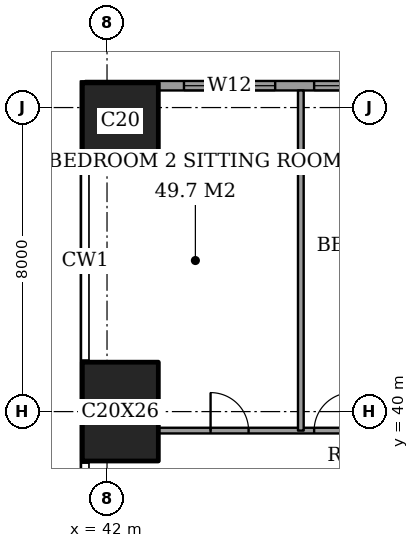
"""IFC4 building model, lengths in metres.
Left out: names, types, materials, properties, quantities, classifications, styles, units other than length and angle.
Written with IfcOpenShell. Run it as: python <this file> out.ifc"""

import sys

from ifc_helpers import new_model, si_unit, direction, frame, frame_2d, origin, origin_2d, place, context, subcontext, project, spatial, rectangle, extrude, element, fill, save


model = new_model("IFC4")
c1 = context("Model", 3, precision=1e-05, world=origin(), true_north=direction((0.0, 1.0)))
c2 = subcontext(c1, "Body", "Model", "MODEL_VIEW")
j1 = project(units=[si_unit("LENGTHUNIT", "METRE"), si_unit("PLANEANGLEUNIT", "RADIAN")], contexts=[c1])
p1 = place(None, origin())
s1 = spatial("IfcSite", under=j1, at=p1, CompositionType="ELEMENT")
p2 = place(p1, origin())
s2 = spatial("IfcBuilding", under=s1, at=p2, CompositionType="ELEMENT")
p3 = place(p2, frame((0.0, 0.0, 121.4)))
s3 = spatial("IfcBuildingStorey", under=s2, at=p3, CompositionType="ELEMENT", Elevation=121.4)
p4 = place(p3, frame((42.35, 40.0, 0.0), z_axis=(0.0, 0.0, 1.0), x_axis=(1.0, 0.0, 0.0)))
e1 = element("IfcColumn", 1, at=p4, inside=s3, PredefinedType="COLUMN", context=c2, shape_type="SweptSolid", body=[
    extrude(rectangle(XDim=2.0, YDim=2.6, at=origin_2d()), origin(), (0.0, 0.0, 1.0), 3.6),
])
p5 = place(p3, frame((42.35, 47.65, 0.0), z_axis=(0.0, 0.0, 1.0), x_axis=(1.0, 0.0, 0.0)))
e2 = element("IfcColumn", 2, at=p5, inside=s3, PredefinedType="COLUMN", context=c2, shape_type="SweptSolid", body=[
    extrude(rectangle(XDim=2.0, YDim=2.0, at=origin_2d()), origin(), (0.0, 0.0, 1.0), 3.6),
])
p6 = place(p3, frame((62.825, 48.575, 0.0), z_axis=(0.0, 0.0, 1.0), x_axis=(-1.0, 0.0, 0.0)))
e3 = element("IfcWall", 3, at=p6, inside=s3, PredefinedType="SOLIDWALL", context=c2, shape_type="SweptSolid", body=[
    extrude(rectangle(XDim=21.4, YDim=0.25, at=frame_2d((10.7, 0.0))), origin(), (0.0, 0.0, 1.0), 3.6),
])
p7 = place(p6, frame((0.875, 0.0, 0.4)))
e4 = element("IfcOpeningElement", 4, at=p7, cuts=e3, PredefinedType="OPENING", context=c2, shape_type="SweptSolid", body=[
    extrude(rectangle(XDim=1.2, YDim=2.2, at=frame_2d((0.6, 1.1))), frame((0.0, 0.135, 0.0), z_axis=(0.0, -1.0, 0.0), x_axis=(1.0, 0.0, 0.0)), (0.0, 0.0, 1.0), 0.27),
])
p8 = place(p6, frame((6.525, 0.0, 0.4)))
e5 = element("IfcOpeningElement", 5, at=p8, cuts=e3, PredefinedType="OPENING", context=c2, shape_type="SweptSolid", body=[
    extrude(rectangle(XDim=2.4, YDim=2.2, at=frame_2d((1.2, 1.1))), frame((0.0, 0.135, 0.0), z_axis=(0.0, -1.0, 0.0), x_axis=(1.0, 0.0, 0.0)), (0.0, 0.0, 1.0), 0.27),
])
p9 = place(p6, frame((9.975, 0.0, 0.4)))
e6 = element("IfcOpeningElement", 6, at=p9, cuts=e3, PredefinedType="OPENING", context=c2, shape_type="SweptSolid", body=[
    extrude(rectangle(XDim=1.2, YDim=2.2, at=frame_2d((0.6, 1.1))), frame((0.0, 0.135, 0.0), z_axis=(0.0, -1.0, 0.0), x_axis=(1.0, 0.0, 0.0)), (0.0, 0.0, 1.0), 0.27),
])
p10 = place(p6, frame((14.175, 0.0, 0.4)))
e7 = element("IfcOpeningElement", 7, at=p10, cuts=e3, PredefinedType="OPENING", context=c2, shape_type="SweptSolid", body=[
    extrude(rectangle(XDim=1.2, YDim=2.2, at=frame_2d((0.6, 1.1))), frame((0.0, 0.135, 0.0), z_axis=(0.0, -1.0, 0.0), x_axis=(1.0, 0.0, 0.0)), (0.0, 0.0, 1.0), 0.27),
])
p11 = place(p6, frame((16.4, 0.0, 0.4)))
e8 = element("IfcOpeningElement", 8, at=p11, cuts=e3, PredefinedType="OPENING", context=c2, shape_type="SweptSolid", body=[
    extrude(rectangle(XDim=2.4, YDim=2.2, at=frame_2d((1.2, 1.1))), frame((0.0, 0.135, 0.0), z_axis=(0.0, -1.0, 0.0), x_axis=(1.0, 0.0, 0.0)), (0.0, 0.0, 1.0), 0.27),
])
p12 = place(p3, frame((43.35, 39.5, 0.0), z_axis=(0.0, 0.0, 1.0), x_axis=(1.0, 0.0, 0.0)))
e9 = element("IfcWall", 9, at=p12, inside=s3, PredefinedType="PARTITIONING", context=c2, shape_type="SweptSolid", body=[
    extrude(rectangle(XDim=5.45, YDim=0.15, at=frame_2d((2.725, 0.0))), origin(), (0.0, 0.0, 1.0), 3.35),
])
p13 = place(p12, frame((4.1, 0.0, 0.0)))
e10 = element("IfcOpeningElement", 10, at=p13, cuts=e9, PredefinedType="OPENING", context=c2, shape_type="SweptSolid", body=[
    extrude(rectangle(XDim=1.0, YDim=2.1, at=frame_2d((0.5, 1.05))), frame((0.0, 0.085, 0.0), z_axis=(0.0, -1.0, 0.0), x_axis=(1.0, 0.0, 0.0)), (0.0, 0.0, 1.0), 0.17),
])
p14 = place(p12, frame((1.375, 0.0, 0.0)))
e11 = element("IfcOpeningElement", 11, at=p14, cuts=e9, PredefinedType="OPENING", context=c2, shape_type="SweptSolid", body=[
    extrude(rectangle(XDim=1.0, YDim=2.1, at=frame_2d((0.5, 1.05))), frame((0.0, 0.085, 0.0), z_axis=(0.0, -1.0, 0.0), x_axis=(1.0, 0.0, 0.0)), (0.0, 0.0, 1.0), 0.17),
])
p15 = place(p3, frame((47.1, 39.5, 0.0), z_axis=(0.0, 0.0, 1.0), x_axis=(0.0, 1.0, 0.0)))
e12 = element("IfcWall", 12, at=p15, inside=s3, PredefinedType="PARTITIONING", context=c2, shape_type="SweptSolid", body=[
    extrude(rectangle(XDim=8.95, YDim=0.15, at=frame_2d((4.475, 0.0))), origin(), (0.0, 0.0, 1.0), 3.35),
])
p16 = place(p10, origin())
e13 = element("IfcWindow", 13, at=p16, inside=s3, PartitioningType="SINGLE_PANEL", PredefinedType="WINDOW", context=c2, shape_type="SweptSolid", body=[
    extrude(rectangle(XDim=1.2, YDim=2.2, at=frame_2d((0.6, 1.1))), frame((0.0, 0.03, 0.0), z_axis=(0.0, -1.0, 0.0), x_axis=(1.0, 0.0, 0.0)), (0.0, 0.0, 1.0), 0.06),
])
fill(e7, e13)
p17 = place(p11, origin())
e14 = element("IfcWindow", 14, at=p17, inside=s3, PartitioningType="SINGLE_PANEL", PredefinedType="WINDOW", context=c2, shape_type="SweptSolid", body=[
    extrude(rectangle(XDim=2.4, YDim=2.2, at=frame_2d((1.2, 1.1))), frame((0.0, 0.03, 0.0), z_axis=(0.0, -1.0, 0.0), x_axis=(1.0, 0.0, 0.0)), (0.0, 0.0, 1.0), 0.06),
])
fill(e8, e14)
p18 = place(p13, origin())
e15 = element("IfcDoor", 15, at=p18, inside=s3, OperationType="SINGLE_SWING_LEFT", PredefinedType="DOOR", context=c2, shape_type="SweptSolid", body=[
    extrude(rectangle(XDim=1.0, YDim=2.1, at=frame_2d((0.5, 1.05))), frame((0.0, 0.025, 0.0), z_axis=(0.0, -1.0, 0.0), x_axis=(1.0, 0.0, 0.0)), (0.0, 0.0, 1.0), 0.05),
])
fill(e10, e15)
p19 = place(p14, origin())
e16 = element("IfcDoor", 16, at=p19, inside=s3, OperationType="SINGLE_SWING_RIGHT", PredefinedType="DOOR", context=c2, shape_type="SweptSolid", body=[
    extrude(rectangle(XDim=1.0, YDim=2.1, at=frame_2d((0.5, 1.05))), frame((0.0, 0.025, 0.0), z_axis=(0.0, -1.0, 0.0), x_axis=(1.0, 0.0, 0.0)), (0.0, 0.0, 1.0), 0.05),
])
fill(e11, e16)
save(model, sys.argv[1])
